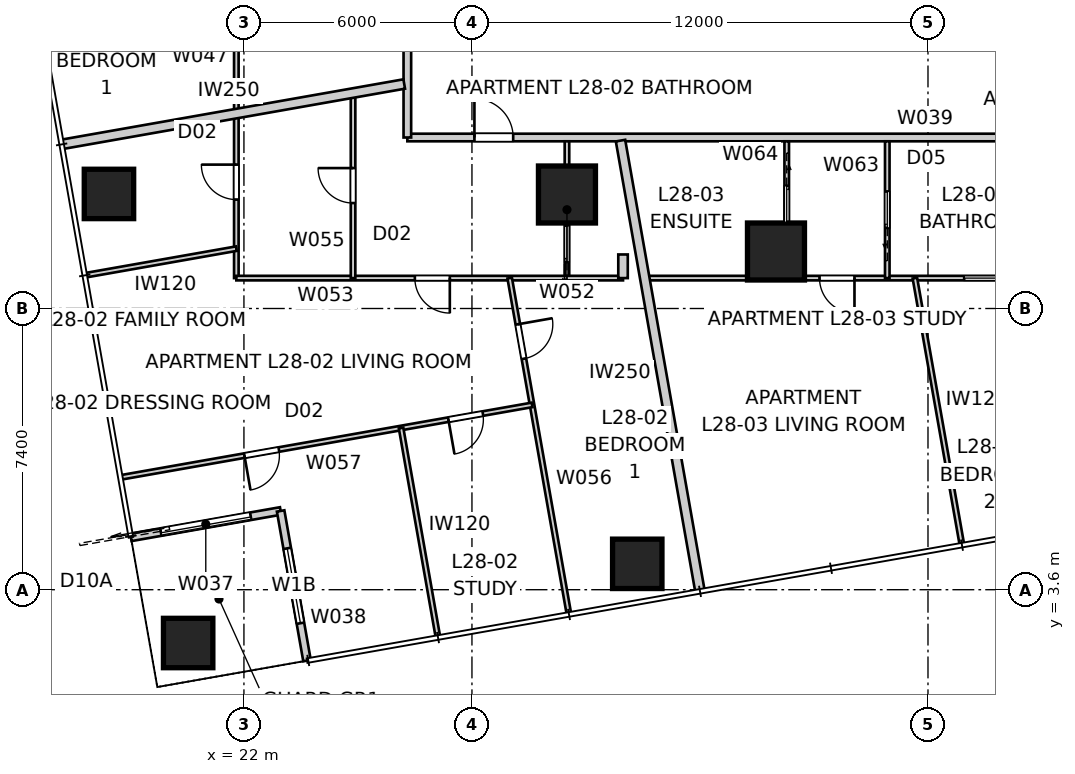
"""IFC4 building model, lengths in metres.
Left out: names, types, materials, properties, quantities, classifications, styles, units other than length and angle.
Written with IfcOpenShell. Run it as: python <this file> out.ifc"""

import sys

from ifc_helpers import new_model, si_unit, direction, frame, frame_2d, origin, origin_2d, place, context, subcontext, project, spatial, rectangle, extrude, element, fill, save


model = new_model("IFC4")
c1 = context("Model", 3, precision=1e-05, world=origin(), true_north=direction((0.0, 1.0)))
c2 = subcontext(c1, "Body", "Model", "MODEL_VIEW")
j1 = project(units=[si_unit("LENGTHUNIT", "METRE"), si_unit("PLANEANGLEUNIT", "RADIAN")], contexts=[c1])
p1 = place(None, origin())
s1 = spatial("IfcSite", under=j1, at=p1, CompositionType="ELEMENT")
p2 = place(p1, origin())
s2 = spatial("IfcBuilding", under=s1, at=p2, CompositionType="ELEMENT")
p3 = place(p2, frame((0.0, 0.0, 103.2)))
s3 = spatial("IfcBuildingStorey", under=s2, at=p3, CompositionType="ELEMENT", Elevation=103.2)
for number, where, z_axis, x_axis in (
    (1, (20.532, 2.197, 0.0), (0.0, 0.0, 1.0), (1.0, 0.0, 0.0)),
    (2, (32.35, 4.281, 0.0), (0.0, 0.0, 1.0), (1.0, 0.0, 0.0)),
    (3, (18.448, 14.015, 0.0), (0.0, 0.0, 1.0), (1.0, 0.0, 0.0)),
):
    element("IfcColumn", number, at=place(p3, frame(where, z_axis=z_axis, x_axis=x_axis)), inside=s3, PredefinedType="COLUMN", context=c2, shape_type="SweptSolid", body=[
        extrude(rectangle(XDim=1.3, YDim=1.3, at=origin_2d()), origin(), (0.0, 0.0, 1.0), 3.2),
    ])
for number, where, z_axis, x_axis in (
    (4, (30.5, 14.0, 0.0), (0.0, 0.0, 1.0), (1.0, 0.0, 0.0)),
    (5, (36.0, 12.5, 0.0), (0.0, 0.0, 1.0), (1.0, 0.0, 0.0)),
):
    element("IfcColumn", number, at=place(p3, frame(where, z_axis=z_axis, x_axis=x_axis)), inside=s3, PredefinedType="COLUMN", context=c2, shape_type="SweptSolid", body=[
        extrude(rectangle(XDim=1.5, YDim=1.5, at=origin_2d()), origin(), (0.0, 0.0, 1.0), 3.4),
    ])
p4 = place(p3, frame((19.026, 4.978, 0.0), z_axis=(0.0, 0.0, 1.0), x_axis=(0.984808127031, 0.173646056486, 0.0)))
e6 = element("IfcWall", 6, at=p4, inside=s3, PredefinedType="SOLIDWALL", context=c2, shape_type="SweptSolid", body=[
    extrude(rectangle(XDim=4.0, YDim=0.2, at=frame_2d((2.0, 0.0))), origin(), (0.0, 0.0, 1.0), 3.2),
])
p5 = place(p4, frame((0.8, 0.0, 0.0)))
e7 = element("IfcOpeningElement", 7, at=p5, cuts=e6, PredefinedType="OPENING", context=c2, shape_type="SweptSolid", body=[
    extrude(rectangle(XDim=2.4, YDim=2.1, at=frame_2d((1.2, 1.05))), frame((0.0, 0.11, 0.0), z_axis=(0.0, -1.0, 0.0), x_axis=(1.0, 0.0, 0.0)), (0.0, 0.0, 1.0), 0.22),
])
p6 = place(p3, frame((22.966, 5.672, 0.0), z_axis=(0.0, 0.0, 1.0), x_axis=(0.173646056486, -0.984808127031, 0.0)))
e8 = element("IfcWall", 8, at=p6, inside=s3, PredefinedType="SOLIDWALL", context=c2, shape_type="SweptSolid", body=[
    extrude(rectangle(XDim=4.0, YDim=0.2, at=frame_2d((2.0, 0.0))), origin(), (0.0, 0.0, 1.0), 3.2),
])
p7 = place(p6, frame((1.0, 0.0, 0.4)))
e9 = element("IfcOpeningElement", 9, at=p7, cuts=e8, PredefinedType="OPENING", context=c2, shape_type="SweptSolid", body=[
    extrude(rectangle(XDim=2.0, YDim=1.8, at=frame_2d((1.0, 0.9))), frame((0.0, 0.11, 0.0), z_axis=(0.0, -1.0, 0.0), x_axis=(1.0, 0.0, 0.0)), (0.0, 0.0, 1.0), 0.22),
])
p8 = place(p3, frame((26.3, 15.5, 0.0), z_axis=(0.0, 0.0, 1.0), x_axis=(1.0, 0.0, 0.0)))
e10 = element("IfcWall", 10, at=p8, inside=s3, PredefinedType="PARTITIONING", context=c2, shape_type="SweptSolid", body=[
    extrude(rectangle(XDim=27.4, YDim=0.2, at=frame_2d((13.7, 0.0))), origin(), (0.0, 0.0, 1.0), 3.2),
])
p9 = place(p8, frame((24.455, 0.0, 0.0)))
e11 = element("IfcOpeningElement", 11, at=p9, cuts=e10, PredefinedType="OPENING", context=c2, shape_type="SweptSolid", body=[
    extrude(rectangle(XDim=1.02, YDim=2.0, at=frame_2d((0.51, 1.0))), frame((0.0, 0.11, 0.0), z_axis=(0.0, -1.0, 0.0), x_axis=(1.0, 0.0, 0.0)), (0.0, 0.0, 1.0), 0.22),
])
p10 = place(p8, frame((1.765, 0.0, 0.0)))
e12 = element("IfcOpeningElement", 12, at=p10, cuts=e10, PredefinedType="OPENING", context=c2, shape_type="SweptSolid", body=[
    extrude(rectangle(XDim=1.02, YDim=2.0, at=frame_2d((0.51, 1.0))), frame((0.0, 0.11, 0.0), z_axis=(0.0, -1.0, 0.0), x_axis=(1.0, 0.0, 0.0)), (0.0, 0.0, 1.0), 0.22),
])
p11 = place(p3, frame((26.3, 44.5, 0.0), z_axis=(0.0, 0.0, 1.0), x_axis=(0.0, -1.0, 0.0)))
e13 = element("IfcWall", 13, at=p11, inside=s3, PredefinedType="PARTITIONING", context=c2, shape_type="SweptSolid", body=[
    extrude(rectangle(XDim=29.0, YDim=0.2, at=frame_2d((14.5, 0.0))), origin(), (0.0, 0.0, 1.0), 3.2),
])
p12 = place(p11, frame((14.257, 0.0, 0.0)))
e14 = element("IfcOpeningElement", 14, at=p12, cuts=e13, PredefinedType="OPENING", context=c2, shape_type="SweptSolid", body=[
    extrude(rectangle(XDim=1.02, YDim=2.34, at=frame_2d((0.51, 1.17))), frame((0.0, 0.11, 0.0), z_axis=(0.0, -1.0, 0.0), x_axis=(1.0, 0.0, 0.0)), (0.0, 0.0, 1.0), 0.22),
])
p13 = place(p11, frame((18.322, 0.0, 0.0)))
e15 = element("IfcOpeningElement", 15, at=p13, cuts=e13, PredefinedType="OPENING", context=c2, shape_type="SweptSolid", body=[
    extrude(rectangle(XDim=1.02, YDim=2.34, at=frame_2d((0.51, 1.17))), frame((0.0, 0.11, 0.0), z_axis=(0.0, -1.0, 0.0), x_axis=(1.0, 0.0, 0.0)), (0.0, 0.0, 1.0), 0.22),
])
p14 = place(p11, frame((4.263, 0.0, 0.0)))
e16 = element("IfcOpeningElement", 16, at=p14, cuts=e13, PredefinedType="OPENING", context=c2, shape_type="SweptSolid", body=[
    extrude(rectangle(XDim=1.02, YDim=2.34, at=frame_2d((0.51, 1.17))), frame((0.0, 0.11, 0.0), z_axis=(0.0, -1.0, 0.0), x_axis=(1.0, 0.0, 0.0)), (0.0, 0.0, 1.0), 0.22),
])
p15 = place(p3, frame((34.001, 3.556, 0.0), z_axis=(0.0, 0.0, 1.0), x_axis=(-0.173654664517, 0.984806609184, 0.0)))
e17 = element("IfcWall", 17, at=p15, inside=s3, PredefinedType="PARTITIONING", context=c2, shape_type="SweptSolid", body=[
    extrude(rectangle(XDim=12.044, YDim=0.25, at=frame_2d((6.022, 0.0))), origin(), (0.0, 0.0, 1.0), 3.2),
])
p16 = place(p3, frame((17.203, 15.318, 0.0), z_axis=(0.0, 0.0, 1.0), x_axis=(0.984810933893, 0.173630137029, 0.0)))
e18 = element("IfcWall", 18, at=p16, inside=s3, PredefinedType="PARTITIONING", context=c2, shape_type="SweptSolid", body=[
    extrude(rectangle(XDim=9.154, YDim=0.25, at=frame_2d((4.577, 0.0))), origin(), (0.0, 0.0, 1.0), 3.2),
])
p17 = place(p3, frame((21.8, 11.8, 0.0), z_axis=(0.0, 0.0, 1.0), x_axis=(0.0, 1.0, 0.0)))
e19 = element("IfcWall", 19, at=p17, inside=s3, PredefinedType="PARTITIONING", context=c2, shape_type="SweptSolid", body=[
    extrude(rectangle(XDim=25.653, YDim=0.12, at=frame_2d((12.826, 0.0))), origin(), (0.0, 0.0, 1.0), 3.2),
])
p18 = place(p17, frame((16.333, 0.0, 0.0)))
e20 = element("IfcOpeningElement", 20, at=p18, cuts=e19, PredefinedType="OPENING", context=c2, shape_type="SweptSolid", body=[
    extrude(rectangle(XDim=0.92, YDim=2.34, at=frame_2d((0.46, 1.17))), frame((0.0, 0.07, 0.0), z_axis=(0.0, -1.0, 0.0), x_axis=(1.0, 0.0, 0.0)), (0.0, 0.0, 1.0), 0.14),
])
p19 = place(p17, frame((18.821, 0.0, 0.0)))
e21 = element("IfcOpeningElement", 21, at=p19, cuts=e19, PredefinedType="OPENING", context=c2, shape_type="SweptSolid", body=[
    extrude(rectangle(XDim=0.92, YDim=2.34, at=frame_2d((0.46, 1.17))), frame((0.0, 0.07, 0.0), z_axis=(0.0, -1.0, 0.0), x_axis=(1.0, 0.0, 0.0)), (0.0, 0.0, 1.0), 0.14),
])
p20 = place(p17, frame((12.401, 0.0, 0.0)))
e22 = element("IfcOpeningElement", 22, at=p20, cuts=e19, PredefinedType="OPENING", context=c2, shape_type="SweptSolid", body=[
    extrude(rectangle(XDim=0.92, YDim=2.34, at=frame_2d((0.46, 1.17))), frame((0.0, 0.07, 0.0), z_axis=(0.0, -1.0, 0.0), x_axis=(1.0, 0.0, 0.0)), (0.0, 0.0, 1.0), 0.14),
])
p21 = place(p17, frame((2.066, 0.0, 0.0)))
e23 = element("IfcOpeningElement", 23, at=p21, cuts=e19, PredefinedType="OPENING", context=c2, shape_type="SweptSolid", body=[
    extrude(rectangle(XDim=0.92, YDim=2.34, at=frame_2d((0.46, 1.17))), frame((0.0, 0.07, 0.0), z_axis=(0.0, -1.0, 0.0), x_axis=(1.0, 0.0, 0.0)), (0.0, 0.0, 1.0), 0.14),
])
p22 = place(p17, frame((23.651, 0.0, 0.0)))
e24 = element("IfcOpeningElement", 24, at=p22, cuts=e19, PredefinedType="OPENING", context=c2, shape_type="SweptSolid", body=[
    extrude(rectangle(XDim=0.96, YDim=2.1, at=frame_2d((0.48, 1.05))), frame((0.0, 0.07, 0.0), z_axis=(0.0, -1.0, 0.0), x_axis=(1.0, 0.0, 0.0)), (0.0, 0.0, 1.0), 0.14),
])
p23 = place(p3, frame((30.5, 11.8, 0.0), z_axis=(0.0, 0.0, 1.0), x_axis=(0.0, 1.0, 0.0)))
e25 = element("IfcWall", 25, at=p23, inside=s3, PredefinedType="PARTITIONING", context=c2, shape_type="SweptSolid", body=[
    extrude(rectangle(XDim=3.6, YDim=0.12, at=frame_2d((1.8, 0.0))), origin(), (0.0, 0.0, 1.0), 3.2),
])
p24 = place(p23, frame((0.42, 0.0, 0.0)))
e26 = element("IfcOpeningElement", 26, at=p24, cuts=e25, PredefinedType="OPENING", context=c2, shape_type="SweptSolid", body=[
    extrude(rectangle(XDim=0.96, YDim=2.1, at=frame_2d((0.48, 1.05))), frame((0.0, 0.07, 0.0), z_axis=(0.0, -1.0, 0.0), x_axis=(1.0, 0.0, 0.0)), (0.0, 0.0, 1.0), 0.14),
])
p25 = place(p3, frame((31.975, 11.8, 0.0), z_axis=(0.0, 0.0, 1.0), x_axis=(-1.0, 0.0, 0.0)))
e27 = element("IfcWall", 27, at=p25, inside=s3, PredefinedType="PARTITIONING", context=c2, shape_type="SweptSolid", body=[
    extrude(rectangle(XDim=10.175, YDim=0.12, at=frame_2d((5.088, 0.0))), origin(), (0.0, 0.0, 1.0), 3.2),
])
p26 = place(p25, frame((4.558, 0.0, 0.0)))
e28 = element("IfcOpeningElement", 28, at=p26, cuts=e27, PredefinedType="OPENING", context=c2, shape_type="SweptSolid", body=[
    extrude(rectangle(XDim=0.92, YDim=2.0, at=frame_2d((0.46, 1.0))), frame((0.0, 0.07, 0.0), z_axis=(0.0, -1.0, 0.0), x_axis=(1.0, 0.0, 0.0)), (0.0, 0.0, 1.0), 0.14),
])
p27 = place(p3, frame((31.975, 12.422, 0.0), z_axis=(0.0, 0.0, 1.0), x_axis=(0.0, -1.0, 0.0)))
e29 = element("IfcWall", 29, at=p27, inside=s3, PredefinedType="PARTITIONING", context=c2, shape_type="SweptSolid", body=[
    extrude(rectangle(XDim=0.622, YDim=0.25, at=frame_2d((0.311, 0.0))), origin(), (0.0, 0.0, 1.0), 3.2),
])
p28 = place(p3, frame((24.871, 11.8, 0.0), z_axis=(0.0, 0.0, 1.0), x_axis=(0.0, 1.0, 0.0)))
e30 = element("IfcWall", 30, at=p28, inside=s3, PredefinedType="PARTITIONING", context=c2, shape_type="SweptSolid", body=[
    extrude(rectangle(XDim=4.87, YDim=0.12, at=frame_2d((2.435, 0.0))), origin(), (0.0, 0.0, 1.0), 3.2),
])
p29 = place(p28, frame((1.975, 0.0, 0.0)))
e31 = element("IfcOpeningElement", 31, at=p29, cuts=e30, PredefinedType="OPENING", context=c2, shape_type="SweptSolid", body=[
    extrude(rectangle(XDim=0.92, YDim=2.34, at=frame_2d((0.46, 1.17))), frame((0.0, 0.07, 0.0), z_axis=(0.0, -1.0, 0.0), x_axis=(1.0, 0.0, 0.0)), (0.0, 0.0, 1.0), 0.14),
])
p30 = place(p3, frame((28.993, 11.8, 0.0), z_axis=(0.0, 0.0, 1.0), x_axis=(0.173639020759, -0.984809367578, 0.0)))
e32 = element("IfcWall", 32, at=p30, inside=s3, PredefinedType="PARTITIONING", context=c2, shape_type="SweptSolid", body=[
    extrude(rectangle(XDim=8.948, YDim=0.12, at=frame_2d((4.474, 0.0))), origin(), (0.0, 0.0, 1.0), 2.4),
])
p31 = place(p30, frame((1.234, 0.0, 0.0)))
e33 = element("IfcOpeningElement", 33, at=p31, cuts=e32, PredefinedType="OPENING", context=c2, shape_type="SweptSolid", body=[
    extrude(rectangle(XDim=0.92, YDim=2.34, at=frame_2d((0.46, 1.17))), frame((0.0, 0.07, 0.0), z_axis=(0.0, -1.0, 0.0), x_axis=(1.0, 0.0, 0.0)), (0.0, 0.0, 1.0), 0.14),
])
p32 = place(p3, frame((29.582, 8.463, 0.0), z_axis=(0.0, 0.0, 1.0), x_axis=(-0.98480552757, -0.173660798302, 0.0)))
e34 = element("IfcWall", 34, at=p32, inside=s3, PredefinedType="PARTITIONING", context=c2, shape_type="SweptSolid", body=[
    extrude(rectangle(XDim=10.96, YDim=0.12, at=frame_2d((5.48, 0.0))), origin(), (0.0, 0.0, 1.0), 3.2),
])
p33 = place(p32, frame((6.765, 0.0, 0.0)))
e35 = element("IfcOpeningElement", 35, at=p33, cuts=e34, PredefinedType="OPENING", context=c2, shape_type="SweptSolid", body=[
    extrude(rectangle(XDim=0.92, YDim=2.34, at=frame_2d((0.46, 1.17))), frame((0.0, 0.07, 0.0), z_axis=(0.0, -1.0, 0.0), x_axis=(1.0, 0.0, 0.0)), (0.0, 0.0, 1.0), 0.14),
])
p34 = place(p32, frame((1.315, 0.0, 0.0)))
e36 = element("IfcOpeningElement", 36, at=p34, cuts=e34, PredefinedType="OPENING", context=c2, shape_type="SweptSolid", body=[
    extrude(rectangle(XDim=0.92, YDim=2.34, at=frame_2d((0.46, 1.17))), frame((0.0, 0.07, 0.0), z_axis=(0.0, -1.0, 0.0), x_axis=(1.0, 0.0, 0.0)), (0.0, 0.0, 1.0), 0.14),
])
p35 = place(p3, frame((17.85, 11.878, 0.0), z_axis=(0.0, 0.0, 1.0), x_axis=(0.984803775068, 0.173670736201, 0.0)))
e37 = element("IfcWall", 37, at=p35, inside=s3, PredefinedType="PARTITIONING", context=c2, shape_type="SweptSolid", body=[
    extrude(rectangle(XDim=4.011, YDim=0.12, at=frame_2d((2.005, 0.0))), origin(), (0.0, 0.0, 1.0), 2.4),
])
p36 = place(p3, frame((26.135, 7.855, 0.0), z_axis=(0.0, 0.0, 1.0), x_axis=(0.173635023028, -0.984810072439, 0.0)))
e38 = element("IfcWall", 38, at=p36, inside=s3, PredefinedType="PARTITIONING", context=c2, shape_type="SweptSolid", body=[
    extrude(rectangle(XDim=5.56, YDim=0.12, at=frame_2d((2.78, 0.0))), origin(), (0.0, 0.0, 1.0), 3.2),
])
p37 = place(p3, frame((58.2, 11.8, 0.0), z_axis=(0.0, 0.0, 1.0), x_axis=(-1.0, 0.0, 0.0)))
e39 = element("IfcWall", 39, at=p37, inside=s3, PredefinedType="PARTITIONING", context=c2, shape_type="SweptSolid", body=[
    extrude(rectangle(XDim=25.653, YDim=0.12, at=frame_2d((12.826, 0.0))), origin(), (0.0, 0.0, 1.0), 3.2),
])
p38 = place(p37, frame((7.342, 0.0, 0.0)))
e40 = element("IfcOpeningElement", 40, at=p38, cuts=e39, PredefinedType="OPENING", context=c2, shape_type="SweptSolid", body=[
    extrude(rectangle(XDim=0.92, YDim=2.34, at=frame_2d((0.46, 1.17))), frame((0.0, 0.07, 0.0), z_axis=(0.0, -1.0, 0.0), x_axis=(1.0, 0.0, 0.0)), (0.0, 0.0, 1.0), 0.14),
])
p39 = place(p37, frame((12.394, 0.0, 0.0)))
e41 = element("IfcOpeningElement", 41, at=p39, cuts=e39, PredefinedType="OPENING", context=c2, shape_type="SweptSolid", body=[
    extrude(rectangle(XDim=0.96, YDim=2.1, at=frame_2d((0.48, 1.05))), frame((0.0, 0.07, 0.0), z_axis=(0.0, -1.0, 0.0), x_axis=(1.0, 0.0, 0.0)), (0.0, 0.0, 1.0), 0.14),
])
p40 = place(p37, frame((16.288, 0.0, 0.0)))
e42 = element("IfcOpeningElement", 42, at=p40, cuts=e39, PredefinedType="OPENING", context=c2, shape_type="SweptSolid", body=[
    extrude(rectangle(XDim=0.96, YDim=2.1, at=frame_2d((0.48, 1.05))), frame((0.0, 0.07, 0.0), z_axis=(0.0, -1.0, 0.0), x_axis=(1.0, 0.0, 0.0)), (0.0, 0.0, 1.0), 0.14),
])
p41 = place(p37, frame((20.134, 0.0, 0.0)))
e43 = element("IfcOpeningElement", 43, at=p41, cuts=e39, PredefinedType="OPENING", context=c2, shape_type="SweptSolid", body=[
    extrude(rectangle(XDim=0.92, YDim=2.34, at=frame_2d((0.46, 1.17))), frame((0.0, 0.07, 0.0), z_axis=(0.0, -1.0, 0.0), x_axis=(1.0, 0.0, 0.0)), (0.0, 0.0, 1.0), 0.14),
])
p42 = place(p3, frame((38.929, 11.8, 0.0), z_axis=(0.0, 0.0, 1.0), x_axis=(0.0, 1.0, 0.0)))
e44 = element("IfcWall", 44, at=p42, inside=s3, PredefinedType="PARTITIONING", context=c2, shape_type="SweptSolid", body=[
    extrude(rectangle(XDim=3.6, YDim=0.12, at=frame_2d((1.8, 0.0))), origin(), (0.0, 0.0, 1.0), 3.2),
])
p43 = place(p42, frame((1.32, 0.0, 0.0)))
e45 = element("IfcOpeningElement", 45, at=p43, cuts=e44, PredefinedType="OPENING", context=c2, shape_type="SweptSolid", body=[
    extrude(rectangle(XDim=0.96, YDim=2.1, at=frame_2d((0.48, 1.05))), frame((0.0, 0.07, 0.0), z_axis=(0.0, -1.0, 0.0), x_axis=(1.0, 0.0, 0.0)), (0.0, 0.0, 1.0), 0.14),
])
p44 = place(p3, frame((36.283, 15.4, 0.0), z_axis=(0.0, 0.0, 1.0), x_axis=(0.0, -1.0, 0.0)))
e46 = element("IfcWall", 46, at=p44, inside=s3, PredefinedType="PARTITIONING", context=c2, shape_type="SweptSolid", body=[
    extrude(rectangle(XDim=3.6, YDim=0.12, at=frame_2d((1.8, 0.0))), origin(), (0.0, 0.0, 1.0), 3.2),
])
p45 = place(p44, frame((1.17, 0.0, 0.0)))
e47 = element("IfcOpeningElement", 47, at=p45, cuts=e46, PredefinedType="OPENING", context=c2, shape_type="SweptSolid", body=[
    extrude(rectangle(XDim=0.96, YDim=2.1, at=frame_2d((0.48, 1.05))), frame((0.0, 0.07, 0.0), z_axis=(0.0, -1.0, 0.0), x_axis=(1.0, 0.0, 0.0)), (0.0, 0.0, 1.0), 0.14),
])
p46 = place(p3, frame((39.655, 11.8, 0.0), z_axis=(0.0, 0.0, 1.0), x_axis=(0.17363617165, -0.984809869921, 0.0)))
e48 = element("IfcWall", 48, at=p46, inside=s3, PredefinedType="PARTITIONING", context=c2, shape_type="SweptSolid", body=[
    extrude(rectangle(XDim=7.096, YDim=0.12, at=frame_2d((3.548, 0.0))), origin(), (0.0, 0.0, 1.0), 3.2),
])
p47 = place(p5, origin())
e49 = element("IfcDoor", 49, at=p47, inside=s3, OperationType="SLIDING_TO_LEFT", PredefinedType="DOOR", context=c2, shape_type="SweptSolid", body=[
    extrude(rectangle(XDim=2.4, YDim=2.1, at=frame_2d((1.2, 1.05))), frame((0.0, 0.025, 0.0), z_axis=(0.0, -1.0, 0.0), x_axis=(1.0, 0.0, 0.0)), (0.0, 0.0, 1.0), 0.05),
])
fill(e7, e49)
p48 = place(p7, origin())
e50 = element("IfcWindow", 50, at=p48, inside=s3, PartitioningType="SINGLE_PANEL", PredefinedType="WINDOW", context=c2, shape_type="SweptSolid", body=[
    extrude(rectangle(XDim=2.0, YDim=1.8, at=frame_2d((1.0, 0.9))), frame((0.0, 0.03, 0.0), z_axis=(0.0, -1.0, 0.0), x_axis=(1.0, 0.0, 0.0)), (0.0, 0.0, 1.0), 0.06),
])
fill(e9, e50)
p49 = place(p10, origin())
e51 = element("IfcDoor", 51, at=p49, inside=s3, OperationType="SINGLE_SWING_LEFT", PredefinedType="DOOR", context=c2, shape_type="SweptSolid", body=[
    extrude(rectangle(XDim=1.02, YDim=2.0, at=frame_2d((0.51, 1.0))), frame((0.0, 0.025, 0.0), z_axis=(0.0, -1.0, 0.0), x_axis=(1.0, 0.0, 0.0)), (0.0, 0.0, 1.0), 0.05),
])
fill(e12, e51)
p50 = place(p29, origin())
e52 = element("IfcDoor", 52, at=p50, inside=s3, OperationType="SINGLE_SWING_RIGHT", PredefinedType="DOOR", context=c2, shape_type="SweptSolid", body=[
    extrude(rectangle(XDim=0.92, YDim=2.34, at=frame_2d((0.46, 1.17))), frame((0.0, 0.025, 0.0), z_axis=(0.0, -1.0, 0.0), x_axis=(1.0, 0.0, 0.0)), (0.0, 0.0, 1.0), 0.05),
])
fill(e31, e52)
p51 = place(p26, origin())
e53 = element("IfcDoor", 53, at=p51, inside=s3, OperationType="SINGLE_SWING_LEFT", PredefinedType="DOOR", context=c2, shape_type="SweptSolid", body=[
    extrude(rectangle(XDim=0.92, YDim=2.0, at=frame_2d((0.46, 1.0))), frame((0.0, 0.025, 0.0), z_axis=(0.0, -1.0, 0.0), x_axis=(1.0, 0.0, 0.0)), (0.0, 0.0, 1.0), 0.05),
])
fill(e28, e53)
p52 = place(p24, origin())
e54 = element("IfcDoor", 54, at=p52, inside=s3, OperationType="SLIDING_TO_LEFT", PredefinedType="DOOR", context=c2, shape_type="SweptSolid", body=[
    extrude(rectangle(XDim=0.96, YDim=2.1, at=frame_2d((0.48, 1.05))), frame((0.0, 0.025, 0.0), z_axis=(0.0, -1.0, 0.0), x_axis=(1.0, 0.0, 0.0)), (0.0, 0.0, 1.0), 0.05),
])
fill(e26, e54)
p53 = place(p21, origin())
e55 = element("IfcDoor", 55, at=p53, inside=s3, OperationType="SINGLE_SWING_RIGHT", PredefinedType="DOOR", context=c2, shape_type="SweptSolid", body=[
    extrude(rectangle(XDim=0.92, YDim=2.34, at=frame_2d((0.46, 1.17))), frame((0.0, 0.025, 0.0), z_axis=(0.0, -1.0, 0.0), x_axis=(1.0, 0.0, 0.0)), (0.0, 0.0, 1.0), 0.05),
])
fill(e23, e55)
p54 = place(p33, origin())
e56 = element("IfcDoor", 56, at=p54, inside=s3, OperationType="SINGLE_SWING_RIGHT", PredefinedType="DOOR", context=c2, shape_type="SweptSolid", body=[
    extrude(rectangle(XDim=0.92, YDim=2.34, at=frame_2d((0.46, 1.17))), frame((0.0, 0.025, 0.0), z_axis=(0.0, -1.0, 0.0), x_axis=(1.0, 0.0, 0.0)), (0.0, 0.0, 1.0), 0.05),
])
fill(e35, e56)
p55 = place(p34, origin())
e57 = element("IfcDoor", 57, at=p55, inside=s3, OperationType="SINGLE_SWING_RIGHT", PredefinedType="DOOR", context=c2, shape_type="SweptSolid", body=[
    extrude(rectangle(XDim=0.92, YDim=2.34, at=frame_2d((0.46, 1.17))), frame((0.0, 0.025, 0.0), z_axis=(0.0, -1.0, 0.0), x_axis=(1.0, 0.0, 0.0)), (0.0, 0.0, 1.0), 0.05),
])
fill(e36, e57)
p56 = place(p31, origin())
e58 = element("IfcDoor", 58, at=p56, inside=s3, OperationType="SINGLE_SWING_LEFT", PredefinedType="DOOR", context=c2, shape_type="SweptSolid", body=[
    extrude(rectangle(XDim=0.92, YDim=2.34, at=frame_2d((0.46, 1.17))), frame((0.0, 0.025, 0.0), z_axis=(0.0, -1.0, 0.0), x_axis=(1.0, 0.0, 0.0)), (0.0, 0.0, 1.0), 0.05),
])
fill(e33, e58)
p57 = place(p40, origin())
e59 = element("IfcDoor", 59, at=p57, inside=s3, OperationType="SLIDING_TO_LEFT", PredefinedType="DOOR", context=c2, shape_type="SweptSolid", body=[
    extrude(rectangle(XDim=0.96, YDim=2.1, at=frame_2d((0.48, 1.05))), frame((0.0, 0.025, 0.0), z_axis=(0.0, -1.0, 0.0), x_axis=(1.0, 0.0, 0.0)), (0.0, 0.0, 1.0), 0.05),
])
fill(e42, e59)
p58 = place(p43, origin())
e60 = element("IfcDoor", 60, at=p58, inside=s3, OperationType="SLIDING_TO_LEFT", PredefinedType="DOOR", context=c2, shape_type="SweptSolid", body=[
    extrude(rectangle(XDim=0.96, YDim=2.1, at=frame_2d((0.48, 1.05))), frame((0.0, 0.025, 0.0), z_axis=(0.0, -1.0, 0.0), x_axis=(1.0, 0.0, 0.0)), (0.0, 0.0, 1.0), 0.05),
])
fill(e45, e60)
p59 = place(p45, origin())
e61 = element("IfcDoor", 61, at=p59, inside=s3, OperationType="SLIDING_TO_LEFT", PredefinedType="DOOR", context=c2, shape_type="SweptSolid", body=[
    extrude(rectangle(XDim=0.96, YDim=2.1, at=frame_2d((0.48, 1.05))), frame((0.0, 0.025, 0.0), z_axis=(0.0, -1.0, 0.0), x_axis=(1.0, 0.0, 0.0)), (0.0, 0.0, 1.0), 0.05),
])
fill(e47, e61)
p60 = place(p41, origin())
e62 = element("IfcDoor", 62, at=p60, inside=s3, OperationType="SINGLE_SWING_LEFT", PredefinedType="DOOR", context=c2, shape_type="SweptSolid", body=[
    extrude(rectangle(XDim=0.92, YDim=2.34, at=frame_2d((0.46, 1.17))), frame((0.0, 0.025, 0.0), z_axis=(0.0, -1.0, 0.0), x_axis=(1.0, 0.0, 0.0)), (0.0, 0.0, 1.0), 0.05),
])
fill(e43, e62)
save(model, sys.argv[1])
